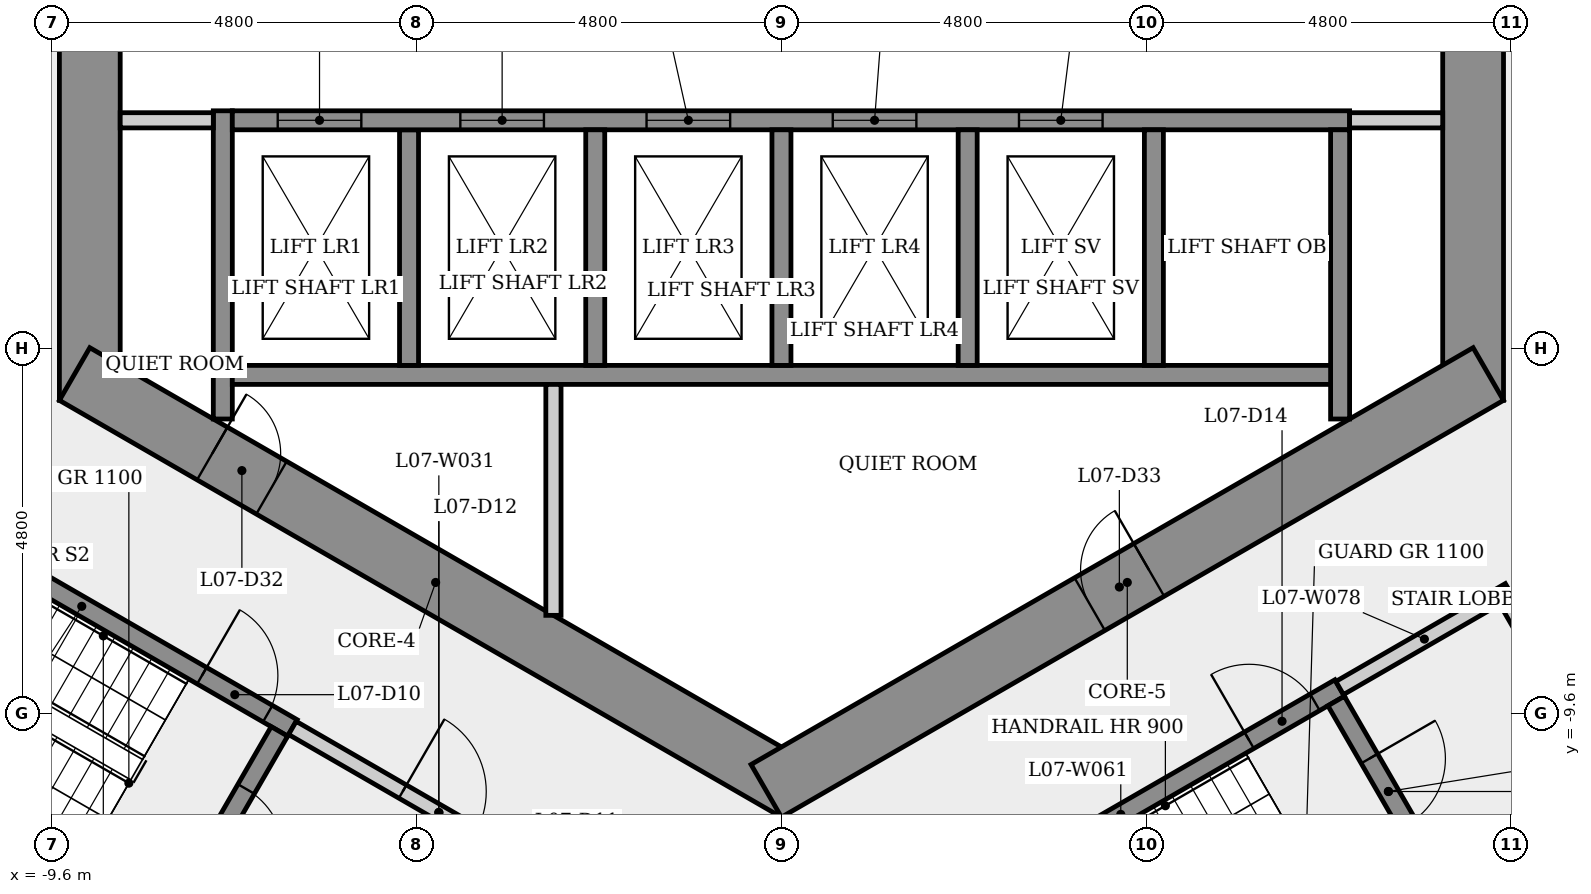
"""IFC4 building model, lengths in metres.
Left out: names, types, materials, properties, quantities, classifications, styles, units other than length and angle.
Written with IfcOpenShell. Run it as: python <this file> out.ifc"""

import sys

from ifc_helpers import new_model, si_unit, direction, frame, frame_2d, origin, place, context, subcontext, project, spatial, rectangle, extrude, element, fill, save


model = new_model("IFC4")
c1 = context("Model", 3, precision=1e-05, world=origin(), true_north=direction((0.0, 1.0)))
c2 = subcontext(c1, "Body", "Model", "MODEL_VIEW")
j1 = project(units=[si_unit("LENGTHUNIT", "METRE"), si_unit("PLANEANGLEUNIT", "RADIAN")], contexts=[c1])
p1 = place(None, origin())
s1 = spatial("IfcSite", under=j1, at=p1, CompositionType="ELEMENT")
p2 = place(p1, origin())
s2 = spatial("IfcBuilding", under=s1, at=p2, CompositionType="ELEMENT")
p3 = place(p2, frame((0.0, 0.0, 32.3)))
s3 = spatial("IfcBuildingStorey", under=s2, at=p3, CompositionType="ELEMENT", Elevation=32.3)
p4 = place(p3, frame((9.1, -5.485, 0.0), z_axis=(0.0, 0.0, 1.0), x_axis=(0.0, 1.0, 0.0)))
e1 = element("IfcWall", 1, at=p4, inside=s3, PredefinedType="SHEAR", context=c2, shape_type="SweptSolid", body=[
    extrude(rectangle(XDim=10.97, YDim=0.8, at=frame_2d((5.485, 0.0))), origin(), (0.0, 0.0, 1.0), 3.4),
])
p5 = place(p4, frame((4.685, 0.0, 0.0)))
e2 = element("IfcOpeningElement", 2, at=p5, cuts=e1, PredefinedType="OPENING", context=c2, shape_type="SweptSolid", body=[
    extrude(rectangle(XDim=1.6, YDim=2.1, at=frame_2d((0.8, 1.05))), frame((0.0, 0.41, 0.0), z_axis=(0.0, -1.0, 0.0), x_axis=(1.0, 0.0, 0.0)), (0.0, 0.0, 1.0), 0.82),
])
p6 = place(p3, frame((-9.1, 5.485, 0.0), z_axis=(0.0, 0.0, 1.0), x_axis=(0.0, -1.0, 0.0)))
e3 = element("IfcWall", 3, at=p6, inside=s3, PredefinedType="SHEAR", context=c2, shape_type="SweptSolid", body=[
    extrude(rectangle(XDim=10.97, YDim=0.8, at=frame_2d((5.485, 0.0))), origin(), (0.0, 0.0, 1.0), 3.4),
])
p7 = place(p6, frame((4.685, 0.0, 0.0)))
e4 = element("IfcOpeningElement", 4, at=p7, cuts=e3, PredefinedType="OPENING", context=c2, shape_type="SweptSolid", body=[
    extrude(rectangle(XDim=1.6, YDim=2.1, at=frame_2d((0.8, 1.05))), frame((0.0, 0.41, 0.0), z_axis=(0.0, -1.0, 0.0), x_axis=(1.0, 0.0, 0.0)), (0.0, 0.0, 1.0), 0.82),
])
p8 = place(p3, frame((-9.3, -5.138, 0.0), z_axis=(0.0, 0.0, 1.0), x_axis=(0.866023993627, -0.500002442456, 0.0)))
e5 = element("IfcWall", 5, at=p8, inside=s3, PredefinedType="SHEAR", context=c2, shape_type="SweptSolid", body=[
    extrude(rectangle(XDim=10.97, YDim=0.8, at=frame_2d((5.485, 0.0))), origin(), (0.0, 0.0, 1.0), 3.4),
])
p9 = place(p8, frame((2.091, 0.0, 0.0)))
e6 = element("IfcOpeningElement", 6, at=p9, cuts=e5, PredefinedType="OPENING", context=c2, shape_type="SweptSolid", body=[
    extrude(rectangle(XDim=0.9, YDim=2.1, at=frame_2d((0.45, 1.05))), frame((0.0, 0.41, 0.0), z_axis=(0.0, -1.0, 0.0), x_axis=(1.0, 0.0, 0.0)), (0.0, 0.0, 1.0), 0.82),
])
p10 = place(p3, frame((-0.2, -10.623, 0.0), z_axis=(0.0, 0.0, 1.0), x_axis=(0.866023993627, 0.500002442456, 0.0)))
e7 = element("IfcWall", 7, at=p10, inside=s3, PredefinedType="SHEAR", context=c2, shape_type="SweptSolid", body=[
    extrude(rectangle(XDim=10.97, YDim=0.8, at=frame_2d((5.485, 0.0))), origin(), (0.0, 0.0, 1.0), 3.4),
])
p11 = place(p10, frame((4.914, 0.0, 0.0)))
e8 = element("IfcOpeningElement", 8, at=p11, cuts=e7, PredefinedType="OPENING", context=c2, shape_type="SweptSolid", body=[
    extrude(rectangle(XDim=0.9, YDim=2.1, at=frame_2d((0.45, 1.05))), frame((0.0, 0.41, 0.0), z_axis=(0.0, -1.0, 0.0), x_axis=(1.0, 0.0, 0.0)), (0.0, 0.0, 1.0), 0.82),
])
p12 = place(p3, frame((-11.977, -6.595, 0.0), z_axis=(0.0, 0.0, 1.0), x_axis=(0.866025499775, -0.499999833739, 0.0)))
e9 = element("IfcWall", 9, at=p12, inside=s3, PredefinedType="SHEAR", context=c2, shape_type="SweptSolid", body=[
    extrude(rectangle(XDim=6.4, YDim=0.25, at=frame_2d((3.2, 0.0))), origin(), (0.0, 0.0, 1.0), 3.05),
])
p13 = place(p12, frame((5.025, 0.0, 0.0)))
e10 = element("IfcOpeningElement", 10, at=p13, cuts=e9, PredefinedType="OPENING", context=c2, shape_type="SweptSolid", body=[
    extrude(rectangle(XDim=1.0, YDim=2.1, at=frame_2d((0.5, 1.05))), frame((0.0, 0.135, 0.0), z_axis=(0.0, -1.0, 0.0), x_axis=(1.0, 0.0, 0.0)), (0.0, 0.0, 1.0), 0.27),
])
p14 = place(p3, frame((-7.935, -12.393, 0.0), z_axis=(0.0, 0.0, 1.0), x_axis=(-0.866025499775, 0.499999833739, 0.0)))
e11 = element("IfcWall", 11, at=p14, inside=s3, PredefinedType="SHEAR", context=c2, shape_type="SweptSolid", body=[
    extrude(rectangle(XDim=6.4, YDim=0.25, at=frame_2d((3.2, 0.0))), origin(), (0.0, 0.0, 1.0), 3.05),
])
p15 = place(p3, frame((-7.35, -5.73, 0.0), z_axis=(0.0, 0.0, 1.0), x_axis=(0.0, 1.0, 0.0)))
e12 = element("IfcWall", 12, at=p15, inside=s3, PredefinedType="SHEAR", context=c2, shape_type="SweptSolid", body=[
    extrude(rectangle(XDim=4.055, YDim=0.25, at=frame_2d((2.028, 0.0))), origin(), (0.0, 0.0, 1.0), 3.05),
])
p16 = place(p3, frame((-7.475, -1.8, 0.0), z_axis=(0.0, 0.0, 1.0), x_axis=(-1.0, 0.0, 0.0)))
e13 = element("IfcWall", 13, at=p16, inside=s3, PredefinedType="PARTITIONING", context=c2, shape_type="SweptSolid", body=[
    extrude(rectangle(XDim=1.225, YDim=0.2, at=frame_2d((0.613, 0.0))), origin(), (0.0, 0.0, 1.0), 3.05),
])
p17 = place(p3, frame((-6.605, -9.841, 0.0), z_axis=(0.0, 0.0, 1.0), x_axis=(-0.499996545922, -0.866027397988, 0.0)))
e14 = element("IfcWall", 14, at=p17, inside=s3, PredefinedType="SHEAR", context=c2, shape_type="SweptSolid", body=[
    extrude(rectangle(XDim=2.75, YDim=0.25, at=frame_2d((1.375, 0.0))), origin(), (0.0, 0.0, 1.0), 3.05),
])
p18 = place(p17, frame((0.875, 0.0, 0.0)))
e15 = element("IfcOpeningElement", 15, at=p18, cuts=e14, PredefinedType="OPENING", context=c2, shape_type="SweptSolid", body=[
    extrude(rectangle(XDim=1.0, YDim=2.1, at=frame_2d((0.5, 1.05))), frame((0.0, 0.135, 0.0), z_axis=(0.0, -1.0, 0.0), x_axis=(1.0, 0.0, 0.0)), (0.0, 0.0, 1.0), 0.27),
])
p19 = place(p3, frame((-6.435, -9.795, 0.0), z_axis=(0.0, 0.0, 1.0), x_axis=(0.866012907634, -0.500021643343, 0.0)))
e16 = element("IfcWall", 16, at=p19, inside=s3, PredefinedType="PARTITIONING", context=c2, shape_type="SweptSolid", body=[
    extrude(rectangle(XDim=4.45, YDim=0.2, at=frame_2d((2.225, 0.0))), origin(), (0.0, 0.0, 1.0), 3.05),
])
p20 = place(p19, frame((1.675, 0.0, 0.0)))
e17 = element("IfcOpeningElement", 17, at=p20, cuts=e16, PredefinedType="OPENING", context=c2, shape_type="SweptSolid", body=[
    extrude(rectangle(XDim=1.1, YDim=2.1, at=frame_2d((0.55, 1.05))), frame((0.0, 0.11, 0.0), z_axis=(0.0, -1.0, 0.0), x_axis=(1.0, 0.0, 0.0)), (0.0, 0.0, 1.0), 0.22),
])
p21 = place(p3, frame((-7.225, -5.15, 0.0), z_axis=(0.0, 0.0, 1.0), x_axis=(1.0, 0.0, 0.0)))
e18 = element("IfcWall", 18, at=p21, inside=s3, PredefinedType="SHEAR", context=c2, shape_type="SweptSolid", body=[
    extrude(rectangle(XDim=14.7, YDim=0.25, at=frame_2d((7.35, 0.0))), origin(), (0.0, 0.0, 1.0), 3.05),
])
p22 = place(p3, frame((-4.9, -1.925, 0.0), z_axis=(0.0, 0.0, 1.0), x_axis=(0.0, -1.0, 0.0)))
e19 = element("IfcWall", 19, at=p22, inside=s3, PredefinedType="SHEAR", context=c2, shape_type="SweptSolid", body=[
    extrude(rectangle(XDim=3.1, YDim=0.25, at=frame_2d((1.55, 0.0))), origin(), (0.0, 0.0, 1.0), 3.4),
])
p23 = place(p3, frame((-7.225, -1.8, 0.0), z_axis=(0.0, 0.0, 1.0), x_axis=(1.0, 0.0, 0.0)))
e20 = element("IfcWall", 20, at=p23, inside=s3, PredefinedType="SHEAR", context=c2, shape_type="SweptSolid", body=[
    extrude(rectangle(XDim=14.7, YDim=0.25, at=frame_2d((7.35, 0.0))), origin(), (0.0, 0.0, 1.0), 3.05),
])
p24 = place(p23, frame((0.597, 0.0, 0.0)))
e21 = element("IfcOpeningElement", 21, at=p24, cuts=e20, PredefinedType="OPENING", context=c2, shape_type="SweptSolid", body=[
    extrude(rectangle(XDim=1.1, YDim=2.1, at=frame_2d((0.55, 1.05))), frame((0.0, 0.135, 0.0), z_axis=(0.0, -1.0, 0.0), x_axis=(1.0, 0.0, 0.0)), (0.0, 0.0, 1.0), 0.27),
])
p25 = place(p23, frame((3.0, 0.0, 0.0)))
e22 = element("IfcOpeningElement", 22, at=p25, cuts=e20, PredefinedType="OPENING", context=c2, shape_type="SweptSolid", body=[
    extrude(rectangle(XDim=1.1, YDim=2.1, at=frame_2d((0.55, 1.05))), frame((0.0, 0.135, 0.0), z_axis=(0.0, -1.0, 0.0), x_axis=(1.0, 0.0, 0.0)), (0.0, 0.0, 1.0), 0.27),
])
p26 = place(p23, frame((5.45, 0.0, 0.0)))
e23 = element("IfcOpeningElement", 23, at=p26, cuts=e20, PredefinedType="OPENING", context=c2, shape_type="SweptSolid", body=[
    extrude(rectangle(XDim=1.1, YDim=2.1, at=frame_2d((0.55, 1.05))), frame((0.0, 0.135, 0.0), z_axis=(0.0, -1.0, 0.0), x_axis=(1.0, 0.0, 0.0)), (0.0, 0.0, 1.0), 0.27),
])
p27 = place(p23, frame((7.9, 0.0, 0.0)))
e24 = element("IfcOpeningElement", 24, at=p27, cuts=e20, PredefinedType="OPENING", context=c2, shape_type="SweptSolid", body=[
    extrude(rectangle(XDim=1.1, YDim=2.1, at=frame_2d((0.55, 1.05))), frame((0.0, 0.135, 0.0), z_axis=(0.0, -1.0, 0.0), x_axis=(1.0, 0.0, 0.0)), (0.0, 0.0, 1.0), 0.27),
])
p28 = place(p23, frame((10.35, 0.0, 0.0)))
e25 = element("IfcOpeningElement", 25, at=p28, cuts=e20, PredefinedType="OPENING", context=c2, shape_type="SweptSolid", body=[
    extrude(rectangle(XDim=1.1, YDim=2.1, at=frame_2d((0.55, 1.05))), frame((0.0, 0.135, 0.0), z_axis=(0.0, -1.0, 0.0), x_axis=(1.0, 0.0, 0.0)), (0.0, 0.0, 1.0), 0.27),
])
p29 = place(p3, frame((-3.0, -5.275, 0.0), z_axis=(0.0, 0.0, 1.0), x_axis=(0.0, -1.0, 0.0)))
e26 = element("IfcWall", 26, at=p29, inside=s3, PredefinedType="PARTITIONING", context=c2, shape_type="SweptSolid", body=[
    extrude(rectangle(XDim=3.039, YDim=0.2, at=frame_2d((1.52, 0.0))), origin(), (0.0, 0.0, 1.0), 3.05),
])
for number, where, z_axis, x_axis in (
    (27, (-2.45, -1.925, 0.0), (0.0, 0.0, 1.0), (0.0, -1.0, 0.0)),
    (28, (0.0, -1.925, 0.0), (0.0, 0.0, 1.0), (0.0, -1.0, 0.0)),
):
    element("IfcWall", number, at=place(p3, frame(where, z_axis=z_axis, x_axis=x_axis)), inside=s3, PredefinedType="SHEAR", context=c2, shape_type="SweptSolid", body=[
        extrude(rectangle(XDim=3.1, YDim=0.25, at=frame_2d((1.55, 0.0))), origin(), (0.0, 0.0, 1.0), 3.4),
    ])
p30 = place(p3, frame((1.585, -12.595, 0.0), z_axis=(0.0, 0.0, 1.0), x_axis=(0.866036417653, 0.499980922934, 0.0)))
e29 = element("IfcWall", 29, at=p30, inside=s3, PredefinedType="SHEAR", context=c2, shape_type="SweptSolid", body=[
    extrude(rectangle(XDim=6.65, YDim=0.25, at=frame_2d((3.325, 0.0))), origin(), (0.0, 0.0, 1.0), 3.05),
])
p31 = place(p30, frame((5.275, 0.0, 0.0)))
e30 = element("IfcOpeningElement", 30, at=p31, cuts=e29, PredefinedType="OPENING", context=c2, shape_type="SweptSolid", body=[
    extrude(rectangle(XDim=1.0, YDim=2.1, at=frame_2d((0.5, 1.05))), frame((0.0, 0.135, 0.0), z_axis=(0.0, -1.0, 0.0), x_axis=(1.0, 0.0, 0.0)), (0.0, 0.0, 1.0), 0.27),
])
for number, where, z_axis, x_axis in (
    (31, (2.45, -1.925, 0.0), (0.0, 0.0, 1.0), (0.0, -1.0, 0.0)),
    (32, (4.9, -1.925, 0.0), (0.0, 0.0, 1.0), (0.0, -1.0, 0.0)),
):
    element("IfcWall", number, at=place(p3, frame(where, z_axis=z_axis, x_axis=x_axis)), inside=s3, PredefinedType="SHEAR", context=c2, shape_type="SweptSolid", body=[
        extrude(rectangle(XDim=3.1, YDim=0.25, at=frame_2d((1.55, 0.0))), origin(), (0.0, 0.0, 1.0), 3.4),
    ])
p32 = place(p3, frame((7.298, -9.441, 0.0), z_axis=(0.0, 0.0, 1.0), x_axis=(0.500034990121, -0.866005201286, 0.0)))
e33 = element("IfcWall", 33, at=p32, inside=s3, PredefinedType="SHEAR", context=c2, shape_type="SweptSolid", body=[
    extrude(rectangle(XDim=2.75, YDim=0.25, at=frame_2d((1.375, 0.0))), origin(), (0.0, 0.0, 1.0), 3.05),
])
p33 = place(p32, frame((0.875, 0.0, 0.0)))
e34 = element("IfcOpeningElement", 34, at=p33, cuts=e33, PredefinedType="OPENING", context=c2, shape_type="SweptSolid", body=[
    extrude(rectangle(XDim=1.0, YDim=2.1, at=frame_2d((0.5, 1.05))), frame((0.0, 0.135, 0.0), z_axis=(0.0, -1.0, 0.0), x_axis=(1.0, 0.0, 0.0)), (0.0, 0.0, 1.0), 0.27),
])
p34 = place(p3, frame((7.344, -9.27, 0.0), z_axis=(0.0, 0.0, 1.0), x_axis=(0.866005588531, 0.500034319456, 0.0)))
e35 = element("IfcWall", 35, at=p34, inside=s3, PredefinedType="PARTITIONING", context=c2, shape_type="SweptSolid", body=[
    extrude(rectangle(XDim=2.575, YDim=0.2, at=frame_2d((1.288, 0.0))), origin(), (0.0, 0.0, 1.0), 3.05),
])
p35 = place(p3, frame((7.35, -1.925, 0.0), z_axis=(0.0, 0.0, 1.0), x_axis=(0.0, -1.0, 0.0)))
e36 = element("IfcWall", 36, at=p35, inside=s3, PredefinedType="SHEAR", context=c2, shape_type="SweptSolid", body=[
    extrude(rectangle(XDim=3.805, YDim=0.25, at=frame_2d((1.903, 0.0))), origin(), (0.0, 0.0, 1.0), 3.05),
])
p36 = place(p3, frame((8.7, -1.8, 0.0), z_axis=(0.0, 0.0, 1.0), x_axis=(-1.0, 0.0, 0.0)))
e37 = element("IfcWall", 37, at=p36, inside=s3, PredefinedType="PARTITIONING", context=c2, shape_type="SweptSolid", body=[
    extrude(rectangle(XDim=1.225, YDim=0.2, at=frame_2d((0.613, 0.0))), origin(), (0.0, 0.0, 1.0), 3.05),
])
p37 = place(p3, frame((9.537, -8.119, 0.0), z_axis=(0.0, 0.0, 1.0), x_axis=(0.499990139034, -0.866031096941, 0.0)))
e38 = element("IfcWall", 38, at=p37, inside=s3, PredefinedType="PARTITIONING", context=c2, shape_type="SweptSolid", body=[
    extrude(rectangle(XDim=3.0, YDim=0.2, at=frame_2d((1.5, 0.0))), origin(), (0.0, 0.0, 1.0), 3.05),
])
p38 = place(p37, frame((0.935, 0.0, 0.0)))
e39 = element("IfcOpeningElement", 39, at=p38, cuts=e38, PredefinedType="OPENING", context=c2, shape_type="SweptSolid", body=[
    extrude(rectangle(XDim=1.0, YDim=2.1, at=frame_2d((0.5, 1.05))), frame((0.0, 0.11, 0.0), z_axis=(0.0, -1.0, 0.0), x_axis=(1.0, 0.0, 0.0)), (0.0, 0.0, 1.0), 0.22),
])
p39 = place(p3, frame((10.901, -10.681, 0.0), z_axis=(0.0, 0.0, 1.0), x_axis=(-0.866009402589, -0.500027713859, 0.0)))
e40 = element("IfcWall", 40, at=p39, inside=s3, PredefinedType="PARTITIONING", context=c2, shape_type="SweptSolid", body=[
    extrude(rectangle(XDim=2.1, YDim=0.2, at=frame_2d((1.05, 0.0))), origin(), (0.0, 0.0, 1.0), 3.05),
])
p40 = place(p24, origin())
e41 = element("IfcDoor", 41, at=p40, inside=s3, OperationType="SLIDING_TO_LEFT", PredefinedType="DOOR", context=c2, shape_type="SweptSolid", body=[
    extrude(rectangle(XDim=1.1, YDim=2.1, at=frame_2d((0.55, 1.05))), frame((0.0, 0.025, 0.0), z_axis=(0.0, -1.0, 0.0), x_axis=(1.0, 0.0, 0.0)), (0.0, 0.0, 1.0), 0.05),
])
fill(e21, e41)
p41 = place(p25, origin())
e42 = element("IfcDoor", 42, at=p41, inside=s3, OperationType="SLIDING_TO_LEFT", PredefinedType="DOOR", context=c2, shape_type="SweptSolid", body=[
    extrude(rectangle(XDim=1.1, YDim=2.1, at=frame_2d((0.55, 1.05))), frame((0.0, 0.025, 0.0), z_axis=(0.0, -1.0, 0.0), x_axis=(1.0, 0.0, 0.0)), (0.0, 0.0, 1.0), 0.05),
])
fill(e22, e42)
p42 = place(p26, origin())
e43 = element("IfcDoor", 43, at=p42, inside=s3, OperationType="SLIDING_TO_LEFT", PredefinedType="DOOR", context=c2, shape_type="SweptSolid", body=[
    extrude(rectangle(XDim=1.1, YDim=2.1, at=frame_2d((0.55, 1.05))), frame((0.0, 0.025, 0.0), z_axis=(0.0, -1.0, 0.0), x_axis=(1.0, 0.0, 0.0)), (0.0, 0.0, 1.0), 0.05),
])
fill(e23, e43)
p43 = place(p27, origin())
e44 = element("IfcDoor", 44, at=p43, inside=s3, OperationType="SLIDING_TO_LEFT", PredefinedType="DOOR", context=c2, shape_type="SweptSolid", body=[
    extrude(rectangle(XDim=1.1, YDim=2.1, at=frame_2d((0.55, 1.05))), frame((0.0, 0.025, 0.0), z_axis=(0.0, -1.0, 0.0), x_axis=(1.0, 0.0, 0.0)), (0.0, 0.0, 1.0), 0.05),
])
fill(e24, e44)
p44 = place(p28, origin())
e45 = element("IfcDoor", 45, at=p44, inside=s3, OperationType="SLIDING_TO_LEFT", PredefinedType="DOOR", context=c2, shape_type="SweptSolid", body=[
    extrude(rectangle(XDim=1.1, YDim=2.1, at=frame_2d((0.55, 1.05))), frame((0.0, 0.025, 0.0), z_axis=(0.0, -1.0, 0.0), x_axis=(1.0, 0.0, 0.0)), (0.0, 0.0, 1.0), 0.05),
])
fill(e25, e45)
p45 = place(p13, origin())
e46 = element("IfcDoor", 46, at=p45, inside=s3, OperationType="SINGLE_SWING_LEFT", PredefinedType="DOOR", context=c2, shape_type="SweptSolid", body=[
    extrude(rectangle(XDim=1.0, YDim=2.1, at=frame_2d((0.5, 1.05))), frame((0.0, 0.025, 0.0), z_axis=(0.0, -1.0, 0.0), x_axis=(1.0, 0.0, 0.0)), (0.0, 0.0, 1.0), 0.05),
])
fill(e10, e46)
p46 = place(p18, origin())
e47 = element("IfcDoor", 47, at=p46, inside=s3, OperationType="SINGLE_SWING_RIGHT", PredefinedType="DOOR", context=c2, shape_type="SweptSolid", body=[
    extrude(rectangle(XDim=1.0, YDim=2.1, at=frame_2d((0.5, 1.05))), frame((0.0, 0.025, 0.0), z_axis=(0.0, -1.0, 0.0), x_axis=(1.0, 0.0, 0.0)), (0.0, 0.0, 1.0), 0.05),
])
fill(e15, e47)
p47 = place(p20, origin())
e48 = element("IfcDoor", 48, at=p47, inside=s3, OperationType="SINGLE_SWING_LEFT", PredefinedType="DOOR", context=c2, shape_type="SweptSolid", body=[
    extrude(rectangle(XDim=1.1, YDim=2.1, at=frame_2d((0.55, 1.05))), frame((0.0, 0.025, 0.0), z_axis=(0.0, -1.0, 0.0), x_axis=(1.0, 0.0, 0.0)), (0.0, 0.0, 1.0), 0.05),
])
fill(e17, e48)
p48 = place(p31, origin())
e49 = element("IfcDoor", 49, at=p48, inside=s3, OperationType="SINGLE_SWING_LEFT", PredefinedType="DOOR", context=c2, shape_type="SweptSolid", body=[
    extrude(rectangle(XDim=1.0, YDim=2.1, at=frame_2d((0.5, 1.05))), frame((0.0, 0.025, 0.0), z_axis=(0.0, -1.0, 0.0), x_axis=(1.0, 0.0, 0.0)), (0.0, 0.0, 1.0), 0.05),
])
fill(e30, e49)
p49 = place(p33, origin())
e50 = element("IfcDoor", 50, at=p49, inside=s3, OperationType="SINGLE_SWING_LEFT", PredefinedType="DOOR", context=c2, shape_type="SweptSolid", body=[
    extrude(rectangle(XDim=1.0, YDim=2.1, at=frame_2d((0.5, 1.05))), frame((0.0, 0.025, 0.0), z_axis=(0.0, -1.0, 0.0), x_axis=(1.0, 0.0, 0.0)), (0.0, 0.0, 1.0), 0.05),
])
fill(e34, e50)
p50 = place(p9, origin())
e51 = element("IfcDoor", 51, at=p50, inside=s3, OperationType="SINGLE_SWING_LEFT", PredefinedType="DOOR", context=c2, shape_type="SweptSolid", body=[
    extrude(rectangle(XDim=0.9, YDim=2.1, at=frame_2d((0.45, 1.05))), frame((0.0, 0.025, 0.0), z_axis=(0.0, -1.0, 0.0), x_axis=(1.0, 0.0, 0.0)), (0.0, 0.0, 1.0), 0.05),
])
fill(e6, e51)
p51 = place(p11, origin())
e52 = element("IfcDoor", 52, at=p51, inside=s3, OperationType="SINGLE_SWING_RIGHT", PredefinedType="DOOR", context=c2, shape_type="SweptSolid", body=[
    extrude(rectangle(XDim=0.9, YDim=2.1, at=frame_2d((0.45, 1.05))), frame((0.0, 0.025, 0.0), z_axis=(0.0, -1.0, 0.0), x_axis=(1.0, 0.0, 0.0)), (0.0, 0.0, 1.0), 0.05),
])
fill(e8, e52)
save(model, sys.argv[1])
